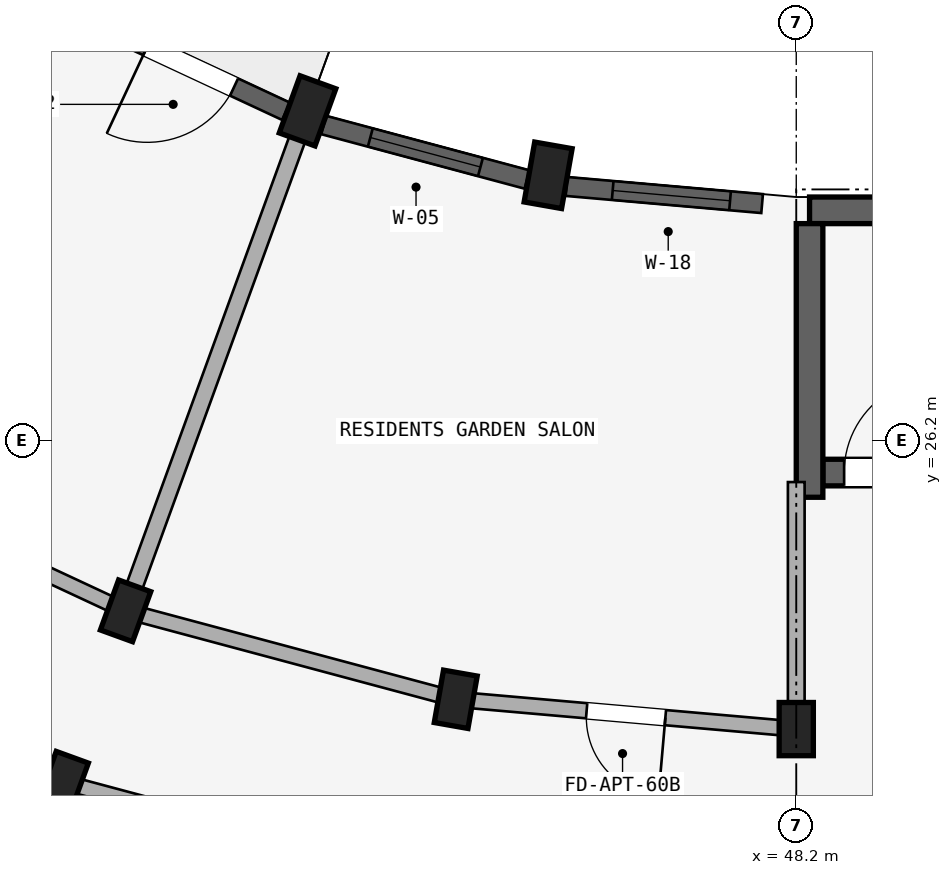
"""IFC4 building model, lengths in metres.
Left out: names, types, materials, properties, quantities, classifications, styles, units other than length and angle.
Written with IfcOpenShell. Run it as: python <this file> out.ifc"""

import sys

from ifc_helpers import new_model, si_unit, direction, frame, frame_2d, origin, origin_2d, place, context, subcontext, project, spatial, rectangle, extrude, element, fill, save


model = new_model("IFC4")
c1 = context("Model", 3, precision=1e-05, world=origin(), true_north=direction((0.0, 1.0)))
c2 = subcontext(c1, "Body", "Model", "MODEL_VIEW")
j1 = project(units=[si_unit("LENGTHUNIT", "METRE"), si_unit("PLANEANGLEUNIT", "RADIAN")], contexts=[c1])
p1 = place(None, origin())
s1 = spatial("IfcSite", under=j1, at=p1, CompositionType="ELEMENT")
p2 = place(p1, origin())
s2 = spatial("IfcBuilding", under=s1, at=p2, CompositionType="ELEMENT")
p3 = place(p2, frame((0.0, 0.0, 21.3)))
s3 = spatial("IfcBuildingStorey", under=s2, at=p3, CompositionType="ELEMENT", Elevation=21.3)
p4 = place(p3, frame((48.375, 29.225, 0.0), z_axis=(0.0, 0.0, 1.0), x_axis=(1.0, 0.0, 0.0)))
e1 = element("IfcWall", 1, at=p4, inside=s3, PredefinedType="SHEAR", context=c2, shape_type="SweptSolid", body=[
    extrude(rectangle(XDim=8.25, YDim=0.35, at=frame_2d((4.125, 0.0))), origin(), (0.0, 0.0, 1.0), 2.93),
])
p5 = place(p3, frame((48.55, 25.775, 0.0), z_axis=(0.0, 0.0, 1.0), x_axis=(1.0, 0.0, 0.0)))
e2 = element("IfcWall", 2, at=p5, inside=s3, PredefinedType="SHEAR", context=c2, shape_type="SweptSolid", body=[
    extrude(rectangle(XDim=7.9, YDim=0.35, at=frame_2d((3.95, 0.0))), origin(), (0.0, 0.0, 1.0), 2.93),
])
p6 = place(p5, frame((0.28, 0.0, 0.0)))
e3 = element("IfcOpeningElement", 3, at=p6, cuts=e2, PredefinedType="OPENING", context=c2, shape_type="SweptSolid", body=[
    extrude(rectangle(XDim=1.24, YDim=2.15, at=frame_2d((0.62, 1.075))), frame((0.0, 0.185, 0.0), z_axis=(0.0, -1.0, 0.0), x_axis=(1.0, 0.0, 0.0)), (0.0, 0.0, 1.0), 0.37),
])
p7 = place(p3, frame((48.375, 29.05, 0.0), z_axis=(0.0, 0.0, 1.0), x_axis=(0.0, -1.0, 0.0)))
e4 = element("IfcWall", 4, at=p7, inside=s3, PredefinedType="SHEAR", context=c2, shape_type="SweptSolid", body=[
    extrude(rectangle(XDim=3.6, YDim=0.35, at=frame_2d((1.8, 0.0))), origin(), (0.0, 0.0, 1.0), 2.93),
])
p8 = place(p3, frame((48.2, 22.4, 0.0), z_axis=(0.0, 0.0, 1.0), x_axis=(1.0, 0.0, 0.0)))
e5 = element("IfcColumn", 5, at=p8, inside=s3, PredefinedType="COLUMN", context=c2, shape_type="SweptSolid", body=[
    extrude(rectangle(XDim=0.45, YDim=0.7, at=origin_2d()), origin(), (0.0, 0.0, 1.0), 2.93),
])
p9 = place(p3, frame((44.935, 29.686, 0.0), z_axis=(0.0, 0.0, 1.0), x_axis=(-0.984807753012, 0.173648177667, 0.0)))
e6 = element("IfcColumn", 6, at=p9, inside=s3, PredefinedType="COLUMN", context=c2, shape_type="SweptSolid", body=[
    extrude(rectangle(XDim=0.5, YDim=0.8, at=origin_2d()), origin(), (0.0, 0.0, 1.0), 2.93),
])
p10 = place(p3, frame((43.72, 22.792, 0.0), z_axis=(0.0, 0.0, 1.0), x_axis=(-0.984807753012, 0.173648177667, 0.0)))
e7 = element("IfcColumn", 7, at=p10, inside=s3, PredefinedType="COLUMN", context=c2, shape_type="SweptSolid", body=[
    extrude(rectangle(XDim=0.45, YDim=0.7, at=origin_2d()), origin(), (0.0, 0.0, 1.0), 2.93),
])
p11 = place(p3, frame((41.77, 30.534, 0.0), z_axis=(0.0, 0.0, 1.0), x_axis=(-0.939692620786, 0.342020143326, 0.0)))
e8 = element("IfcColumn", 8, at=p11, inside=s3, PredefinedType="COLUMN", context=c2, shape_type="SweptSolid", body=[
    extrude(rectangle(XDim=0.5, YDim=0.8, at=origin_2d()), origin(), (0.0, 0.0, 1.0), 2.93),
])
for number, where, z_axis, x_axis in (
    (9, (39.376, 23.956, 0.0), (0.0, 0.0, 1.0), (-0.94, 0.342, 0.0)),
    (10, (38.555, 21.701, 0.0), (0.0, 0.0, 1.0), (-0.94, 0.342, 0.0)),
):
    element("IfcColumn", number, at=place(p3, frame(where, z_axis=z_axis, x_axis=x_axis)), inside=s3, PredefinedType="COLUMN", context=c2, shape_type="SweptSolid", body=[
        extrude(rectangle(XDim=0.45, YDim=0.7, at=origin_2d()), origin(), (0.0, 0.0, 1.0), 2.93),
    ])
p12 = place(p3, frame((48.2, 22.4, 0.0), z_axis=(0.0, 0.0, 1.0), x_axis=(-0.996191949488, 0.087187153726, 0.0)))
e11 = element("IfcWall", 11, at=p12, inside=s3, PredefinedType="STANDARD", context=c2, shape_type="SweptSolid", body=[
    extrude(rectangle(XDim=4.497, YDim=0.2, at=frame_2d((2.249, 0.0))), origin(), (0.0, 0.0, 1.0), 2.372),
])
p13 = place(p12, frame((1.729, 0.0, 0.0)))
e12 = element("IfcOpeningElement", 12, at=p13, cuts=e11, PredefinedType="OPENING", context=c2, shape_type="SweptSolid", body=[
    extrude(rectangle(XDim=1.04, YDim=2.15, at=frame_2d((0.52, 1.075))), frame((0.0, 0.11, 0.0), z_axis=(0.0, -1.0, 0.0), x_axis=(1.0, 0.0, 0.0)), (0.0, 0.0, 1.0), 0.22),
])
p14 = place(p3, frame((43.72, 22.792, 0.0), z_axis=(0.0, 0.0, 1.0), x_axis=(-0.965934240054, 0.258787642463, 0.0)))
e13 = element("IfcWall", 13, at=p14, inside=s3, PredefinedType="STANDARD", context=c2, shape_type="SweptSolid", body=[
    extrude(rectangle(XDim=4.497, YDim=0.2, at=frame_2d((2.249, 0.0))), origin(), (0.0, 0.0, 1.0), 2.372),
])
p15 = place(p3, frame((43.303, 20.428, 0.0), z_axis=(0.0, 0.0, 1.0), x_axis=(-0.965930095386, 0.258803112091, 0.0)))
e14 = element("IfcWall", 14, at=p15, inside=s3, PredefinedType="STANDARD", context=c2, shape_type="SweptSolid", body=[
    extrude(rectangle(XDim=4.916, YDim=0.2, at=frame_2d((2.458, 0.0))), origin(), (0.0, 0.0, 1.0), 2.372),
])
p16 = place(p15, frame((1.938, 0.0, 0.0)))
e15 = element("IfcOpeningElement", 15, at=p16, cuts=e14, PredefinedType="OPENING", context=c2, shape_type="SweptSolid", body=[
    extrude(rectangle(XDim=1.04, YDim=2.15, at=frame_2d((0.52, 1.075))), frame((0.0, 0.11, 0.0), z_axis=(0.0, -1.0, 0.0), x_axis=(1.0, 0.0, 0.0)), (0.0, 0.0, 1.0), 0.22),
])
p17 = place(p3, frame((39.376, 23.956, 0.0), z_axis=(0.0, 0.0, 1.0), x_axis=(-0.906307919131, 0.422617978463, 0.0)))
e16 = element("IfcWall", 16, at=p17, inside=s3, PredefinedType="STANDARD", context=c2, shape_type="SweptSolid", body=[
    extrude(rectangle(XDim=4.497, YDim=0.2, at=frame_2d((2.249, 0.0))), origin(), (0.0, 0.0, 1.0), 2.372),
])
p18 = place(p17, frame((1.709, 0.0, 0.0)))
e17 = element("IfcOpeningElement", 17, at=p18, cuts=e16, PredefinedType="OPENING", context=c2, shape_type="SweptSolid", body=[
    extrude(rectangle(XDim=1.08, YDim=2.15, at=frame_2d((0.54, 1.075))), frame((0.0, 0.11, 0.0), z_axis=(0.0, -1.0, 0.0), x_axis=(1.0, 0.0, 0.0)), (0.0, 0.0, 1.0), 0.22),
])
p19 = place(p3, frame((38.555, 21.701, 0.0), z_axis=(0.0, 0.0, 1.0), x_axis=(-0.906302381024, 0.422629854778, 0.0)))
e18 = element("IfcWall", 18, at=p19, inside=s3, PredefinedType="STANDARD", context=c2, shape_type="SweptSolid", body=[
    extrude(rectangle(XDim=4.915, YDim=0.2, at=frame_2d((2.458, 0.0))), origin(), (0.0, 0.0, 1.0), 2.372),
])
p20 = place(p3, frame((48.2, 25.65, 0.0), z_axis=(0.0, 0.0, 1.0), x_axis=(0.0, -1.0, 0.0)))
e19 = element("IfcWall", 19, at=p20, inside=s3, PredefinedType="STANDARD", context=c2, shape_type="SweptSolid", body=[
    extrude(rectangle(XDim=3.2, YDim=0.22, at=frame_2d((1.6, 0.0))), origin(), (0.0, 0.0, 1.0), 2.372),
])
p21 = place(p3, frame((41.702, 30.346, 0.0), z_axis=(0.0, 0.0, 1.0), x_axis=(-0.342010221662, -0.939696231917, 0.0)))
e20 = element("IfcWall", 20, at=p21, inside=s3, PredefinedType="STANDARD", context=c2, shape_type="SweptSolid", body=[
    extrude(rectangle(XDim=6.75, YDim=0.22, at=frame_2d((3.375, 0.0))), origin(), (0.0, 0.0, 1.0), 2.372),
])
p22 = place(p3, frame((38.521, 21.607, 0.0), z_axis=(0.0, 0.0, 1.0), x_axis=(-0.342015232663, -0.939694408106, 0.0)))
e21 = element("IfcWall", 21, at=p22, inside=s3, PredefinedType="PARTITIONING", context=c2, shape_type="SweptSolid", body=[
    extrude(rectangle(XDim=14.62, YDim=0.15, at=frame_2d((7.31, 0.0))), origin(), (0.0, 0.0, 1.0), 2.372),
])
p23 = place(p22, frame((4.449, 0.0, 0.0)))
e22 = element("IfcOpeningElement", 22, at=p23, cuts=e21, PredefinedType="OPENING", context=c2, shape_type="SweptSolid", body=[
    extrude(rectangle(XDim=0.8, YDim=2.1, at=frame_2d((0.4, 1.05))), frame((0.0, 0.085, 0.0), z_axis=(0.0, -1.0, 0.0), x_axis=(1.0, 0.0, 0.0)), (0.0, 0.0, 1.0), 0.17),
])
p24 = place(p3, frame((47.751, 29.314, 0.0), z_axis=(0.0, 0.0, 1.0), x_axis=(-0.996188278786, 0.087229084652, 0.0)))
e23 = element("IfcWall", 23, at=p24, inside=s3, PredefinedType="STANDARD", context=c2, shape_type="SweptSolid", body=[
    extrude(rectangle(XDim=2.583, YDim=0.25, at=frame_2d((1.292, 0.0))), origin(), (0.0, 0.0, 1.0), 2.472),
])
p25 = place(p24, frame((0.424, 0.0, 0.672)))
e24 = element("IfcOpeningElement", 24, at=p25, cuts=e23, PredefinedType="OPENING", context=c2, shape_type="SweptSolid", body=[
    extrude(rectangle(XDim=1.55, YDim=1.6, at=frame_2d((0.775, 0.8))), frame((0.0, 0.135, 0.0), z_axis=(0.0, -1.0, 0.0), x_axis=(1.0, 0.0, 0.0)), (0.0, 0.0, 1.0), 0.27),
])
p26 = place(p3, frame((44.658, 29.631, 0.0), z_axis=(0.0, 0.0, 1.0), x_axis=(-0.965935855992, 0.25878161084, 0.0)))
e25 = element("IfcWall", 25, at=p26, inside=s3, PredefinedType="STANDARD", context=c2, shape_type="SweptSolid", body=[
    extrude(rectangle(XDim=2.77, YDim=0.25, at=frame_2d((1.385, 0.0))), origin(), (0.0, 0.0, 1.0), 2.472),
])
p27 = place(p26, frame((0.635, 0.0, 0.622)))
e26 = element("IfcOpeningElement", 26, at=p27, cuts=e25, PredefinedType="OPENING", context=c2, shape_type="SweptSolid", body=[
    extrude(rectangle(XDim=1.5, YDim=1.65, at=frame_2d((0.75, 0.825))), frame((0.0, 0.135, 0.0), z_axis=(0.0, -1.0, 0.0), x_axis=(1.0, 0.0, 0.0)), (0.0, 0.0, 1.0), 0.27),
])
p28 = place(p3, frame((41.487, 30.528, 0.0), z_axis=(0.0, 0.0, 1.0), x_axis=(-0.906293449611, 0.422649007088, 0.0)))
e27 = element("IfcWall", 27, at=p28, inside=s3, PredefinedType="STANDARD", context=c2, shape_type="SweptSolid", body=[
    extrude(rectangle(XDim=2.77, YDim=0.25, at=frame_2d((1.385, 0.0))), origin(), (0.0, 0.0, 1.0), 2.472),
])
p29 = place(p28, frame((0.755, 0.0, 0.0)))
e28 = element("IfcOpeningElement", 28, at=p29, cuts=e27, PredefinedType="OPENING", context=c2, shape_type="SweptSolid", body=[
    extrude(rectangle(XDim=1.26, YDim=2.15, at=frame_2d((0.63, 1.075))), frame((0.0, 0.135, 0.0), z_axis=(0.0, -1.0, 0.0), x_axis=(1.0, 0.0, 0.0)), (0.0, 0.0, 1.0), 0.27),
])
p30 = place(p25, origin())
e29 = element("IfcWindow", 29, at=p30, inside=s3, PartitioningType="DOUBLE_PANEL_VERTICAL", PredefinedType="WINDOW", context=c2, shape_type="SweptSolid", body=[
    extrude(rectangle(XDim=1.55, YDim=1.6, at=frame_2d((0.775, 0.8))), frame((0.0, 0.03, 0.0), z_axis=(0.0, -1.0, 0.0), x_axis=(1.0, 0.0, 0.0)), (0.0, 0.0, 1.0), 0.06),
])
fill(e24, e29)
p31 = place(p27, origin())
e30 = element("IfcWindow", 30, at=p31, inside=s3, PartitioningType="DOUBLE_PANEL_VERTICAL", PredefinedType="WINDOW", context=c2, shape_type="SweptSolid", body=[
    extrude(rectangle(XDim=1.5, YDim=1.65, at=frame_2d((0.75, 0.825))), frame((0.0, 0.03, 0.0), z_axis=(0.0, -1.0, 0.0), x_axis=(1.0, 0.0, 0.0)), (0.0, 0.0, 1.0), 0.06),
])
fill(e26, e30)
p32 = place(p6, origin())
e31 = element("IfcDoor", 31, at=p32, inside=s3, OperationType="SINGLE_SWING_RIGHT", PredefinedType="DOOR", context=c2, shape_type="SweptSolid", body=[
    extrude(rectangle(XDim=1.24, YDim=2.15, at=frame_2d((0.62, 1.075))), frame((0.0, 0.025, 0.0), z_axis=(0.0, -1.0, 0.0), x_axis=(1.0, 0.0, 0.0)), (0.0, 0.0, 1.0), 0.05),
])
fill(e3, e31)
p33 = place(p13, frame((1.04, 0.0, 0.0), z_axis=(0.0, 0.0, 1.0), x_axis=(-1.0, 0.0, 0.0)))
e32 = element("IfcDoor", 32, at=p33, inside=s3, OperationType="SINGLE_SWING_RIGHT", PredefinedType="DOOR", context=c2, shape_type="SweptSolid", body=[
    extrude(rectangle(XDim=1.04, YDim=2.15, at=frame_2d((0.52, 1.075))), frame((0.0, 0.025, 0.0), z_axis=(0.0, -1.0, 0.0), x_axis=(1.0, 0.0, 0.0)), (0.0, 0.0, 1.0), 0.05),
])
fill(e12, e32)
p34 = place(p29, frame((1.26, 0.0, 0.0), z_axis=(0.0, 0.0, 1.0), x_axis=(-1.0, 0.0, 0.0)))
e33 = element("IfcDoor", 33, at=p34, inside=s3, OperationType="SINGLE_SWING_LEFT", PredefinedType="DOOR", context=c2, shape_type="SweptSolid", body=[
    extrude(rectangle(XDim=1.26, YDim=2.15, at=frame_2d((0.63, 1.075))), frame((0.0, 0.025, 0.0), z_axis=(0.0, -1.0, 0.0), x_axis=(1.0, 0.0, 0.0)), (0.0, 0.0, 1.0), 0.05),
])
fill(e28, e33)
save(model, sys.argv[1])
